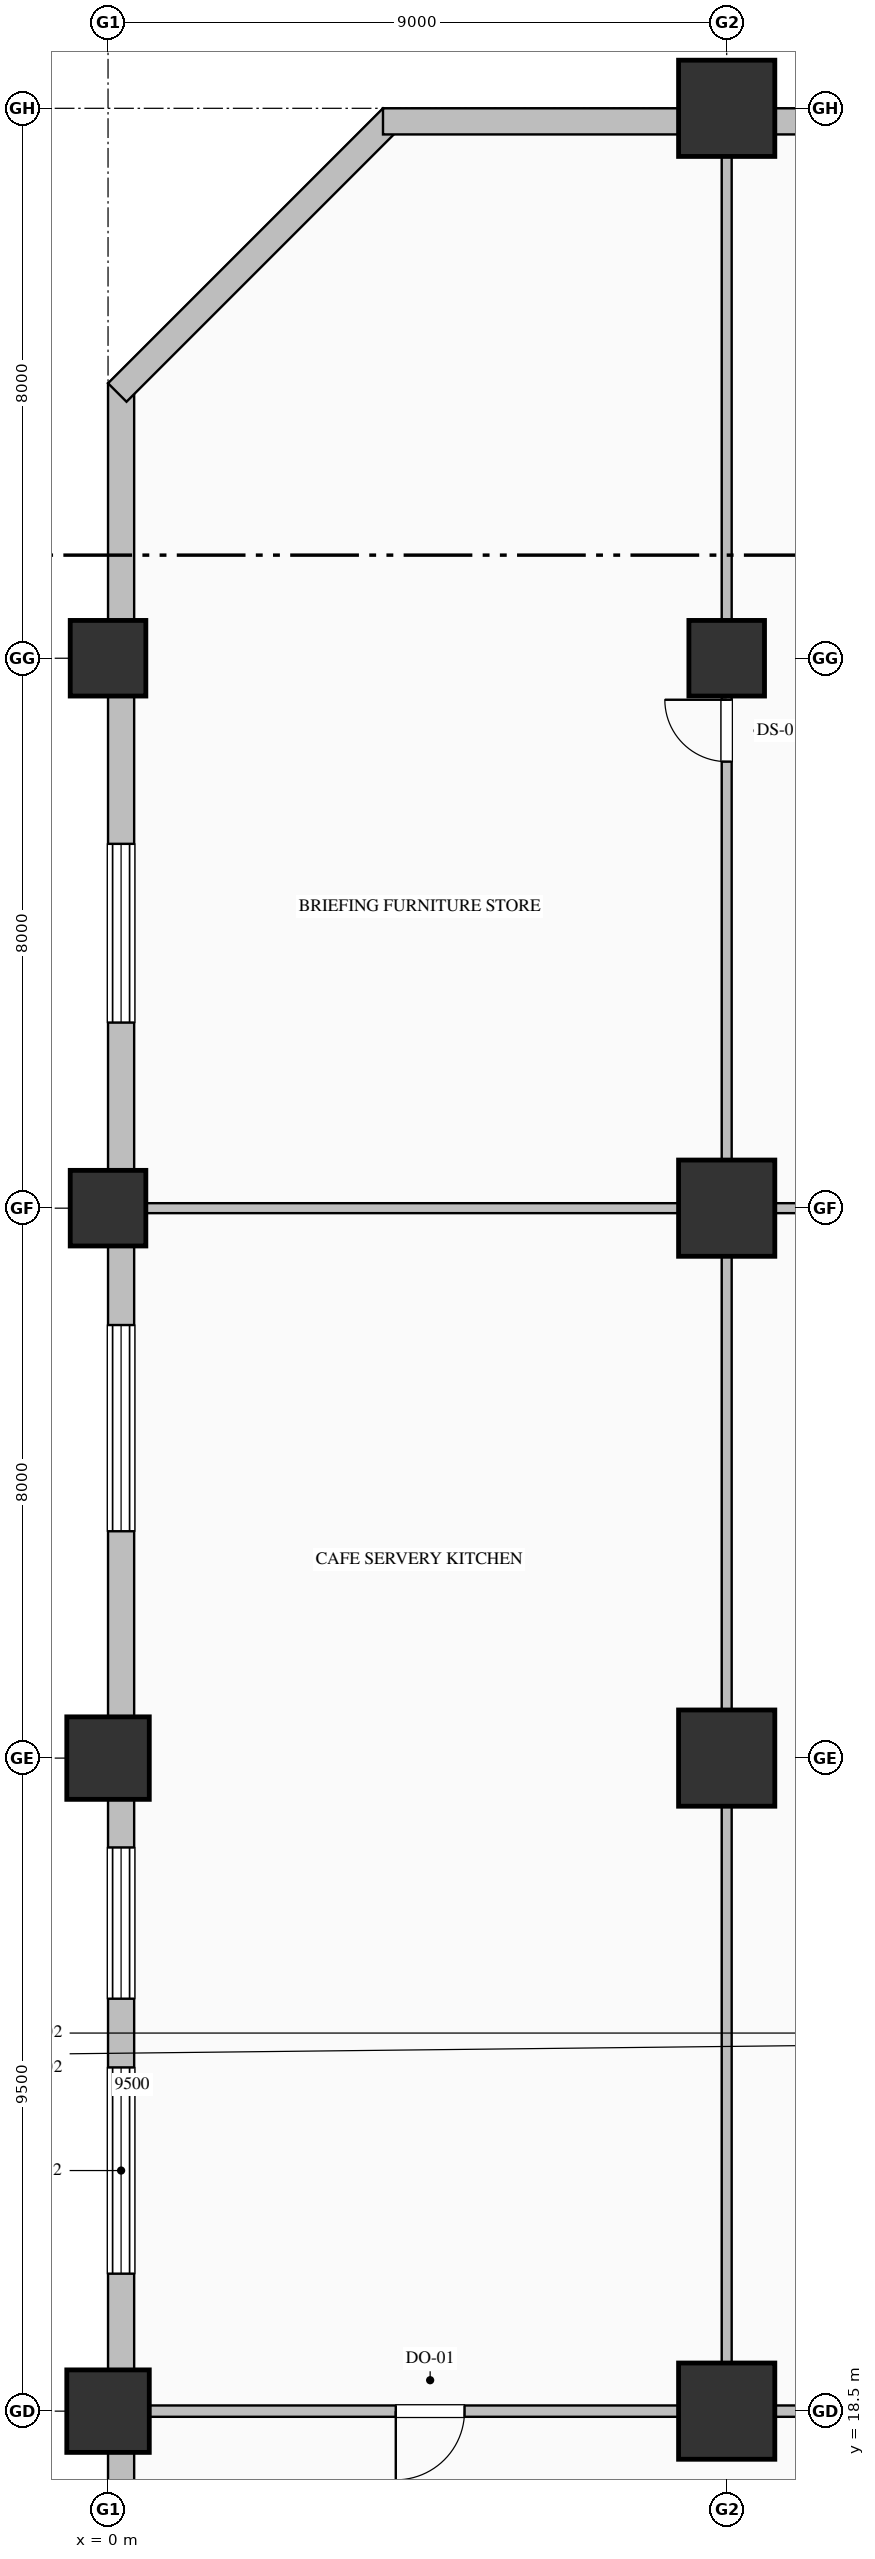
"""IFC4 building model, lengths in metres.
Left out: names, types, materials, properties, quantities, classifications, styles, units other than length and angle.
Written with IfcOpenShell. Run it as: python <this file> out.ifc"""

import sys

from ifc_helpers import new_model, si_unit, direction, frame, frame_2d, origin, origin_2d, place, context, subcontext, project, spatial, rectangle, hollow_rectangle, hollow_circle, extrude, element, fill, save


model = new_model("IFC4")
c1 = context("Model", 3, precision=1e-05, world=origin(), true_north=direction((0.0, 1.0)))
c2 = subcontext(c1, "Body", "Model", "MODEL_VIEW")
j1 = project(units=[si_unit("LENGTHUNIT", "METRE"), si_unit("PLANEANGLEUNIT", "RADIAN")], contexts=[c1])
p1 = place(None, origin())
s1 = spatial("IfcSite", under=j1, at=p1, CompositionType="ELEMENT")
p2 = place(p1, origin())
s2 = spatial("IfcBuilding", under=s1, at=p2, CompositionType="ELEMENT")
p3 = place(p2, frame((0.0, 0.0, 6.0)))
s3 = spatial("IfcBuildingStorey", under=s2, at=p3, CompositionType="ELEMENT", Elevation=6.0)
for number, where, z_axis, x_axis in (
    (1, (0.0, 18.5, 0.0), (0.0, 0.0, 1.0), (1.0, 0.0, 0.0)),
    (2, (0.0, 28.0, 0.0), (0.0, 0.0, 1.0), (1.0, 0.0, 0.0)),
):
    element("IfcColumn", number, at=place(p3, frame(where, z_axis=z_axis, x_axis=x_axis)), inside=s3, PredefinedType="COLUMN", context=c2, shape_type="SweptSolid", body=[
        extrude(hollow_circle(Radius=0.6, WallThickness=0.04, at=origin_2d()), origin(), (0.0, 0.0, 1.0), 5.4),
    ])
for number, where, z_axis, x_axis in (
    (3, (0.0, 36.0, 0.0), (0.0, 0.0, 1.0), (1.0, 0.0, 0.0)),
    (4, (0.0, 44.0, 0.0), (0.0, 0.0, 1.0), (1.0, 0.0, 0.0)),
):
    element("IfcColumn", number, at=place(p3, frame(where, z_axis=z_axis, x_axis=x_axis)), inside=s3, PredefinedType="COLUMN", context=c2, shape_type="SweptSolid", body=[
        extrude(hollow_rectangle(XDim=1.1, YDim=1.1, WallThickness=0.04, at=origin_2d()), origin(), (0.0, 0.0, 1.0), 5.4),
    ])
for number, where, z_axis, x_axis in (
    (5, (9.0, 18.5, 0.0), (0.0, 0.0, 1.0), (1.0, 0.0, 0.0)),
    (6, (9.0, 28.0, 0.0), (0.0, 0.0, 1.0), (1.0, 0.0, 0.0)),
    (7, (9.0, 36.0, 0.0), (0.0, 0.0, 1.0), (1.0, 0.0, 0.0)),
):
    element("IfcColumn", number, at=place(p3, frame(where, z_axis=z_axis, x_axis=x_axis)), inside=s3, PredefinedType="COLUMN", context=c2, shape_type="SweptSolid", body=[
        extrude(hollow_rectangle(XDim=1.4, YDim=1.4, WallThickness=0.05, at=origin_2d()), origin(), (0.0, 0.0, 1.0), 5.4),
    ])
p4 = place(p3, frame((9.0, 44.0, 0.0), z_axis=(0.0, 0.0, 1.0), x_axis=(1.0, 0.0, 0.0)))
e8 = element("IfcColumn", 8, at=p4, inside=s3, PredefinedType="COLUMN", context=c2, shape_type="SweptSolid", body=[
    extrude(rectangle(XDim=1.1, YDim=1.1, at=origin_2d()), origin(), (0.0, 0.0, 1.0), 5.4),
])
p5 = place(p3, frame((9.0, 52.0, 0.0), z_axis=(0.0, 0.0, 1.0), x_axis=(1.0, 0.0, 0.0)))
e9 = element("IfcColumn", 9, at=p5, inside=s3, PredefinedType="COLUMN", context=c2, shape_type="SweptSolid", body=[
    extrude(hollow_rectangle(XDim=1.4, YDim=1.4, WallThickness=0.05, at=origin_2d()), origin(), (0.0, 0.0, 1.0), 5.4),
])
p6 = place(p3, frame((0.19, 4.0, 0.0), z_axis=(0.0, 0.0, 1.0), x_axis=(0.0, 1.0, 0.0)))
e10 = element("IfcWall", 10, at=p6, inside=s3, PredefinedType="SOLIDWALL", context=c2, shape_type="SweptSolid", body=[
    extrude(rectangle(XDim=44.0, YDim=0.38, at=frame_2d((22.0, 0.0))), origin(), (0.0, 0.0, 1.0), 4.62),
])
p7 = place(p6, frame((2.3, 0.0, 0.85)))
e11 = element("IfcOpeningElement", 11, at=p7, cuts=e10, PredefinedType="OPENING", context=c2, shape_type="SweptSolid", body=[
    extrude(rectangle(XDim=2.6, YDim=3.1, at=frame_2d((1.3, 1.55))), frame((0.0, 0.2, 0.0), z_axis=(0.0, -1.0, 0.0), x_axis=(1.0, 0.0, 0.0)), (0.0, 0.0, 1.0), 0.4),
])
p8 = place(p6, frame((9.7, 0.0, 0.9)))
e12 = element("IfcOpeningElement", 12, at=p8, cuts=e10, PredefinedType="OPENING", context=c2, shape_type="SweptSolid", body=[
    extrude(rectangle(XDim=2.2, YDim=2.65, at=frame_2d((1.1, 1.325))), frame((0.0, 0.2, 0.0), z_axis=(0.0, -1.0, 0.0), x_axis=(1.0, 0.0, 0.0)), (0.0, 0.0, 1.0), 0.4),
])
p9 = place(p6, frame((16.5, 0.0, 0.85)))
e13 = element("IfcOpeningElement", 13, at=p9, cuts=e10, PredefinedType="OPENING", context=c2, shape_type="SweptSolid", body=[
    extrude(rectangle(XDim=3.0, YDim=3.2, at=frame_2d((1.5, 1.6))), frame((0.0, 0.2, 0.0), z_axis=(0.0, -1.0, 0.0), x_axis=(1.0, 0.0, 0.0)), (0.0, 0.0, 1.0), 0.4),
])
p10 = place(p6, frame((20.5, 0.0, 0.9)))
e14 = element("IfcOpeningElement", 14, at=p10, cuts=e10, PredefinedType="OPENING", context=c2, shape_type="SweptSolid", body=[
    extrude(rectangle(XDim=2.2, YDim=2.65, at=frame_2d((1.1, 1.325))), frame((0.0, 0.2, 0.0), z_axis=(0.0, -1.0, 0.0), x_axis=(1.0, 0.0, 0.0)), (0.0, 0.0, 1.0), 0.4),
])
p11 = place(p6, frame((27.3, 0.0, 0.85)))
e15 = element("IfcOpeningElement", 15, at=p11, cuts=e10, PredefinedType="OPENING", context=c2, shape_type="SweptSolid", body=[
    extrude(rectangle(XDim=3.0, YDim=3.2, at=frame_2d((1.5, 1.6))), frame((0.0, 0.2, 0.0), z_axis=(0.0, -1.0, 0.0), x_axis=(1.0, 0.0, 0.0)), (0.0, 0.0, 1.0), 0.4),
])
p12 = place(p6, frame((34.7, 0.0, 0.85)))
e16 = element("IfcOpeningElement", 16, at=p12, cuts=e10, PredefinedType="OPENING", context=c2, shape_type="SweptSolid", body=[
    extrude(rectangle(XDim=2.6, YDim=3.1, at=frame_2d((1.3, 1.55))), frame((0.0, 0.2, 0.0), z_axis=(0.0, -1.0, 0.0), x_axis=(1.0, 0.0, 0.0)), (0.0, 0.0, 1.0), 0.4),
])
p13 = place(p3, frame((0.134, 47.866, 0.0), z_axis=(0.0, 0.0, 1.0), x_axis=(0.707106781187, 0.707106781187, 0.0)))
e17 = element("IfcWall", 17, at=p13, inside=s3, PredefinedType="SOLIDWALL", context=c2, shape_type="SweptSolid", body=[
    extrude(rectangle(XDim=5.657, YDim=0.38, at=frame_2d((2.828, 0.0))), origin(), (0.0, 0.0, 1.0), 5.12),
])
p14 = place(p3, frame((4.0, 51.81, 0.0), z_axis=(0.0, 0.0, 1.0), x_axis=(1.0, 0.0, 0.0)))
e18 = element("IfcWall", 18, at=p14, inside=s3, PredefinedType="SOLIDWALL", context=c2, shape_type="SweptSolid", body=[
    extrude(rectangle(XDim=36.52, YDim=0.38, at=frame_2d((18.26, 0.0))), origin(), (0.0, 0.0, 1.0), 4.62),
])
p15 = place(p14, frame((16.7, 0.0, 0.85)))
e19 = element("IfcOpeningElement", 19, at=p15, cuts=e18, PredefinedType="OPENING", context=c2, shape_type="SweptSolid", body=[
    extrude(rectangle(XDim=2.6, YDim=3.1, at=frame_2d((1.3, 1.55))), frame((0.0, 0.2, 0.0), z_axis=(0.0, -1.0, 0.0), x_axis=(1.0, 0.0, 0.0)), (0.0, 0.0, 1.0), 0.4),
])
p16 = place(p14, frame((24.1, 0.0, 0.9)))
e20 = element("IfcOpeningElement", 20, at=p16, cuts=e18, PredefinedType="OPENING", context=c2, shape_type="SweptSolid", body=[
    extrude(rectangle(XDim=2.2, YDim=2.65, at=frame_2d((1.1, 1.325))), frame((0.0, 0.2, 0.0), z_axis=(0.0, -1.0, 0.0), x_axis=(1.0, 0.0, 0.0)), (0.0, 0.0, 1.0), 0.4),
])
p17 = place(p3, frame((9.4, 18.5, 0.0), z_axis=(0.0, 0.0, 1.0), x_axis=(1.0, 0.0, 0.0)))
e21 = element("IfcWall", 21, at=p17, inside=s3, PredefinedType="PARTITIONING", context=c2, shape_type="SweptSolid", body=[
    extrude(rectangle(XDim=26.0, YDim=0.165, at=frame_2d((13.0, 0.0))), origin(), (0.0, 0.0, 1.0), 4.212),
])
p18 = place(p17, frame((12.2, 0.0, 0.0)))
e22 = element("IfcOpeningElement", 22, at=p18, cuts=e21, PredefinedType="OPENING", context=c2, shape_type="SweptSolid", body=[
    extrude(rectangle(XDim=1.6, YDim=2.25, at=frame_2d((0.8, 1.125))), frame((0.0, 0.093, 0.0), z_axis=(0.0, -1.0, 0.0), x_axis=(1.0, 0.0, 0.0)), (0.0, 0.0, 1.0), 0.185),
])
p19 = place(p3, frame((9.0, 18.574, 0.0), z_axis=(0.0, 0.0, 1.0), x_axis=(0.0, 1.0, 0.0)))
e23 = element("IfcWall", 23, at=p19, inside=s3, PredefinedType="PARTITIONING", context=c2, shape_type="SweptSolid", body=[
    extrude(rectangle(XDim=17.361, YDim=0.145, at=frame_2d((8.681, 0.0))), origin(), (0.0, 0.0, 1.0), 4.212),
])
p20 = place(p3, frame((9.0, 36.0, 0.0), z_axis=(0.0, 0.0, 1.0), x_axis=(1.0, 0.0, 0.0)))
e24 = element("IfcWall", 24, at=p20, inside=s3, PredefinedType="PARTITIONING", context=c2, shape_type="SweptSolid", body=[
    extrude(rectangle(XDim=26.4, YDim=0.145, at=frame_2d((13.2, 0.0))), origin(), (0.0, 0.0, 1.0), 4.212),
])
p21 = place(p3, frame((0.372, 36.0, 0.0), z_axis=(0.0, 0.0, 1.0), x_axis=(1.0, 0.0, 0.0)))
e25 = element("IfcWall", 25, at=p21, inside=s3, PredefinedType="PARTITIONING", context=c2, shape_type="SweptSolid", body=[
    extrude(rectangle(XDim=8.628, YDim=0.145, at=frame_2d((4.314, 0.0))), origin(), (0.0, 0.0, 1.0), 4.212),
])
p22 = place(p3, frame((9.0, 18.5, 0.0), z_axis=(0.0, 0.0, 1.0), x_axis=(-1.0, 0.0, 0.0)))
e26 = element("IfcWall", 26, at=p22, inside=s3, PredefinedType="PARTITIONING", context=c2, shape_type="SweptSolid", body=[
    extrude(rectangle(XDim=8.628, YDim=0.165, at=frame_2d((4.314, 0.0))), origin(), (0.0, 0.0, 1.0), 4.212),
])
p23 = place(p22, frame((3.814, 0.0, 0.0)))
e27 = element("IfcOpeningElement", 27, at=p23, cuts=e26, PredefinedType="OPENING", context=c2, shape_type="SweptSolid", body=[
    extrude(rectangle(XDim=1.0, YDim=2.15, at=frame_2d((0.5, 1.075))), frame((0.0, 0.093, 0.0), z_axis=(0.0, -1.0, 0.0), x_axis=(1.0, 0.0, 0.0)), (0.0, 0.0, 1.0), 0.185),
])
p24 = place(p3, frame((9.0, 36.064, 0.0), z_axis=(0.0, 0.0, 1.0), x_axis=(0.0, 1.0, 0.0)))
e28 = element("IfcWall", 28, at=p24, inside=s3, PredefinedType="PARTITIONING", context=c2, shape_type="SweptSolid", body=[
    extrude(rectangle(XDim=15.563, YDim=0.145, at=frame_2d((7.782, 0.0))), origin(), (0.0, 0.0, 1.0), 4.212),
])
p25 = place(p24, frame((6.432, 0.0, 0.0)))
e29 = element("IfcOpeningElement", 29, at=p25, cuts=e28, PredefinedType="OPENING", context=c2, shape_type="SweptSolid", body=[
    extrude(rectangle(XDim=0.9, YDim=2.15, at=frame_2d((0.45, 1.075))), frame((0.0, 0.083, 0.0), z_axis=(0.0, -1.0, 0.0), x_axis=(1.0, 0.0, 0.0)), (0.0, 0.0, 1.0), 0.165),
])
p26 = place(p9, origin())
e30 = element("IfcWindow", 30, at=p26, inside=s3, PartitioningType="TRIPLE_PANEL_VERTICAL", PredefinedType="WINDOW", context=c2, shape_type="SweptSolid", body=[
    extrude(rectangle(XDim=3.0, YDim=3.2, at=frame_2d((1.5, 1.6))), frame((0.0, 0.15, 0.0), z_axis=(0.0, -1.0, 0.0), x_axis=(1.0, 0.0, 0.0)), (0.0, 0.0, 1.0), 0.06),
])
fill(e13, e30)
p27 = place(p10, origin())
e31 = element("IfcWindow", 31, at=p27, inside=s3, PartitioningType="TRIPLE_PANEL_VERTICAL", PredefinedType="WINDOW", context=c2, shape_type="SweptSolid", body=[
    extrude(rectangle(XDim=2.2, YDim=2.65, at=frame_2d((1.1, 1.325))), frame((0.0, 0.15, 0.0), z_axis=(0.0, -1.0, 0.0), x_axis=(1.0, 0.0, 0.0)), (0.0, 0.0, 1.0), 0.06),
])
fill(e14, e31)
p28 = place(p11, origin())
e32 = element("IfcWindow", 32, at=p28, inside=s3, PartitioningType="TRIPLE_PANEL_VERTICAL", PredefinedType="WINDOW", context=c2, shape_type="SweptSolid", body=[
    extrude(rectangle(XDim=3.0, YDim=3.2, at=frame_2d((1.5, 1.6))), frame((0.0, 0.15, 0.0), z_axis=(0.0, -1.0, 0.0), x_axis=(1.0, 0.0, 0.0)), (0.0, 0.0, 1.0), 0.06),
])
fill(e15, e32)
p29 = place(p12, origin())
e33 = element("IfcWindow", 33, at=p29, inside=s3, PartitioningType="TRIPLE_PANEL_VERTICAL", PredefinedType="WINDOW", context=c2, shape_type="SweptSolid", body=[
    extrude(rectangle(XDim=2.6, YDim=3.1, at=frame_2d((1.3, 1.55))), frame((0.0, 0.15, 0.0), z_axis=(0.0, -1.0, 0.0), x_axis=(1.0, 0.0, 0.0)), (0.0, 0.0, 1.0), 0.06),
])
fill(e16, e33)
p30 = place(p23, origin())
e34 = element("IfcDoor", 34, at=p30, inside=s3, OperationType="SINGLE_SWING_RIGHT", PredefinedType="DOOR", context=c2, shape_type="SweptSolid", body=[
    extrude(rectangle(XDim=1.0, YDim=2.15, at=frame_2d((0.5, 1.075))), frame((0.0, 0.025, 0.0), z_axis=(0.0, -1.0, 0.0), x_axis=(1.0, 0.0, 0.0)), (0.0, 0.0, 1.0), 0.05),
])
fill(e27, e34)
p31 = place(p25, origin())
e35 = element("IfcDoor", 35, at=p31, inside=s3, OperationType="SINGLE_SWING_RIGHT", PredefinedType="DOOR", context=c2, shape_type="SweptSolid", body=[
    extrude(rectangle(XDim=0.9, YDim=2.15, at=frame_2d((0.45, 1.075))), frame((0.0, 0.025, 0.0), z_axis=(0.0, -1.0, 0.0), x_axis=(1.0, 0.0, 0.0)), (0.0, 0.0, 1.0), 0.05),
])
fill(e29, e35)
save(model, sys.argv[1])
